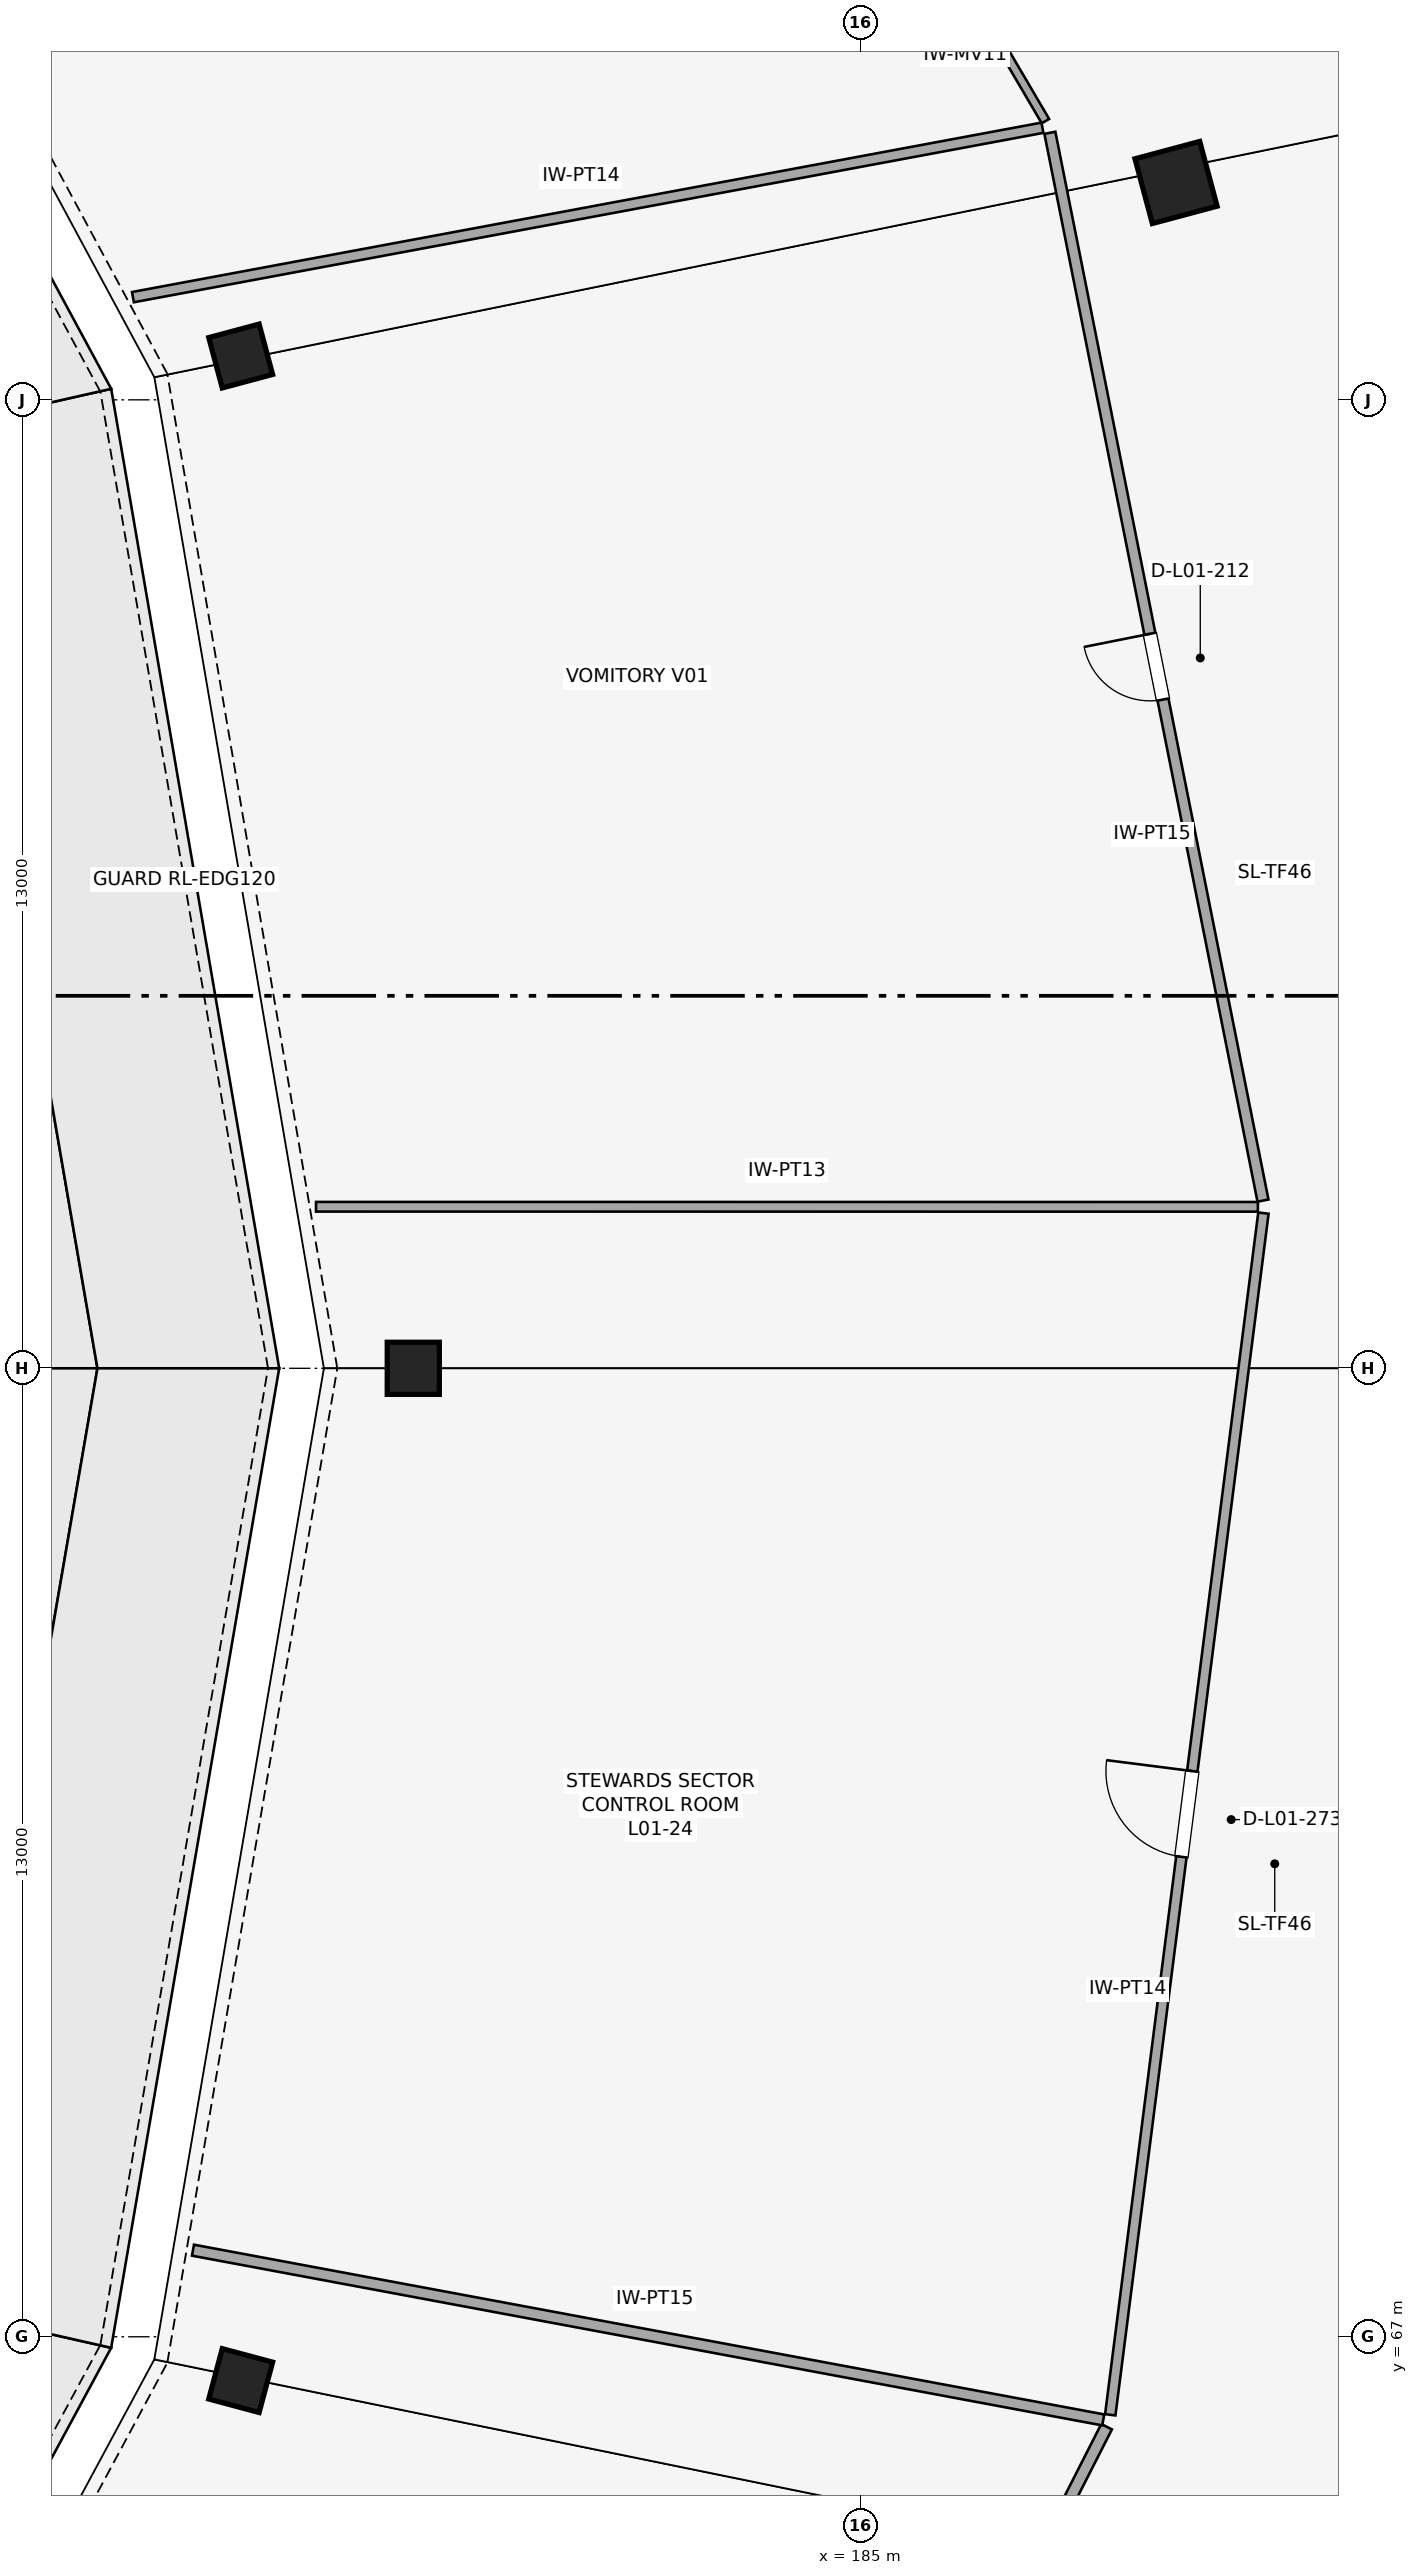
"""IFC4 building model, lengths in metres.
Left out: names, types, materials, properties, quantities, classifications, styles, units other than length and angle.
Written with IfcOpenShell. Run it as: python <this file> out.ifc"""

import sys

from ifc_helpers import new_model, si_unit, direction, frame, frame_2d, origin, origin_2d, place, context, subcontext, project, spatial, rectangle, extrude, element, fill, save


model = new_model("IFC4")
c1 = context("Model", 3, precision=1e-05, world=origin(), true_north=direction((0.0, 1.0)))
c2 = subcontext(c1, "Body", "Model", "MODEL_VIEW")
j1 = project(units=[si_unit("LENGTHUNIT", "METRE"), si_unit("PLANEANGLEUNIT", "RADIAN")], contexts=[c1])
p1 = place(None, origin())
s1 = spatial("IfcSite", under=j1, at=p1, CompositionType="ELEMENT")
p2 = place(p1, origin())
s2 = spatial("IfcBuilding", under=s1, at=p2, CompositionType="ELEMENT")
p3 = place(p2, frame((0.0, 0.0, 5.4)))
s3 = spatial("IfcBuildingStorey", under=s2, at=p3, CompositionType="ELEMENT", Elevation=5.4)
for number, where, z_axis, x_axis in (
    (1, (179.0, 80.0, 0.0), (0.0, 0.0, 1.0), (1.0, 0.0, 0.0)),
    (2, (176.683, 93.588, 0.0), (0.0, 0.0, 1.0), (0.966, 0.259, 0.0)),
    (3, (176.683, 66.412, 0.0), (0.0, 0.0, 1.0), (0.966, -0.259, 0.0)),
):
    element("IfcColumn", number, at=place(p3, frame(where, z_axis=z_axis, x_axis=x_axis)), inside=s3, PredefinedType="COLUMN", context=c2, shape_type="SweptSolid", body=[
        extrude(rectangle(XDim=0.7, YDim=0.7, at=origin_2d()), origin(), (0.0, 0.0, 1.0), 5.2),
    ])
p4 = place(p3, frame((189.24, 95.917, 0.0), z_axis=(0.0, 0.0, 1.0), x_axis=(0.965925826289, 0.258819045103, 0.0)))
e4 = element("IfcColumn", 4, at=p4, inside=s3, PredefinedType="COLUMN", context=c2, shape_type="SweptSolid", body=[
    extrude(rectangle(XDim=0.9, YDim=0.9, at=origin_2d()), origin(), (0.0, 0.0, 1.0), 5.2),
])
p5 = place(p3, frame((190.407, 82.251, 0.0), z_axis=(0.0, 0.0, 1.0), x_axis=(-0.195730656485, 0.980657692629, 0.0)))
e5 = element("IfcWall", 5, at=p5, inside=s3, PredefinedType="PARTITIONING", context=c2, shape_type="SweptSolid", body=[
    extrude(rectangle(XDim=14.616, YDim=0.15, at=frame_2d((7.308, 0.0))), origin(), (0.0, 0.0, 1.0), 3.67),
])
p6 = place(p5, frame((6.858, 0.0, 0.0)))
e6 = element("IfcOpeningElement", 6, at=p6, cuts=e5, PredefinedType="OPENING", context=c2, shape_type="SweptSolid", body=[
    extrude(rectangle(XDim=0.9, YDim=2.24, at=frame_2d((0.45, 1.12))), frame((0.0, 0.085, 0.0), z_axis=(0.0, -1.0, 0.0), x_axis=(1.0, 0.0, 0.0)), (0.0, 0.0, 1.0), 0.17),
])
p7 = place(p3, frame((175.237, 94.378, 0.0), z_axis=(0.0, 0.0, 1.0), x_axis=(0.983098219406, 0.183078920141, 0.0)))
e7 = element("IfcWall", 7, at=p7, inside=s3, PredefinedType="PARTITIONING", context=c2, shape_type="SweptSolid", body=[
    extrude(rectangle(XDim=12.419, YDim=0.14, at=frame_2d((6.209, 0.0))), origin(), (0.0, 0.0, 1.0), 3.67),
])
p8 = place(p3, frame((187.487, 96.741, 0.0), z_axis=(0.0, 0.0, 1.0), x_axis=(-0.506281615283, 0.862368207917, 0.0)))
e8 = element("IfcWall", 8, at=p8, inside=s3, PredefinedType="MOVABLE", context=c2, shape_type="SweptSolid", body=[
    extrude(rectangle(XDim=2.63, YDim=0.115, at=frame_2d((1.315, 0.0))), origin(), (0.0, 0.0, 1.0), 3.67),
])
p9 = place(p3, frame((180.579, 50.615, 0.0), z_axis=(0.0, 0.0, 1.0), x_axis=(0.453783837631, 0.891111793606, 0.0)))
e9 = element("IfcWall", 9, at=p9, inside=s3, PredefinedType="PARTITIONING", context=c2, shape_type="SweptSolid", body=[
    extrude(rectangle(XDim=17.032, YDim=0.16, at=frame_2d((8.516, 0.0))), origin(), (0.0, 0.0, 1.0), 3.67),
])
p10 = place(p9, frame((7.936, 0.0, 0.0)))
e10 = element("IfcOpeningElement", 10, at=p10, cuts=e9, PredefinedType="OPENING", context=c2, shape_type="SweptSolid", body=[
    extrude(rectangle(XDim=1.16, YDim=2.24, at=frame_2d((0.58, 1.12))), frame((0.0, 0.09, 0.0), z_axis=(0.0, -1.0, 0.0), x_axis=(1.0, 0.0, 0.0)), (0.0, 0.0, 1.0), 0.18),
])
p11 = place(p3, frame((176.042, 68.162, 0.0), z_axis=(0.0, 0.0, 1.0), x_axis=(0.983059999048, -0.183284037143, 0.0)))
e11 = element("IfcWall", 11, at=p11, inside=s3, PredefinedType="PARTITIONING", context=c2, shape_type="SweptSolid", body=[
    extrude(rectangle(XDim=12.431, YDim=0.15, at=frame_2d((6.215, 0.0))), origin(), (0.0, 0.0, 1.0), 3.67),
])
p12 = place(p3, frame((188.357, 65.953, 0.0), z_axis=(0.0, 0.0, 1.0), x_axis=(0.126447690865, 0.991973276593, 0.0)))
e12 = element("IfcWall", 12, at=p12, inside=s3, PredefinedType="PARTITIONING", context=c2, shape_type="SweptSolid", body=[
    extrude(rectangle(XDim=16.261, YDim=0.14, at=frame_2d((8.13, 0.0))), origin(), (0.0, 0.0, 1.0), 3.67),
])
p13 = place(p12, frame((7.551, 0.0, 0.0)))
e13 = element("IfcOpeningElement", 13, at=p13, cuts=e12, PredefinedType="OPENING", context=c2, shape_type="SweptSolid", body=[
    extrude(rectangle(XDim=1.16, YDim=2.38, at=frame_2d((0.58, 1.19))), frame((0.0, 0.08, 0.0), z_axis=(0.0, -1.0, 0.0), x_axis=(1.0, 0.0, 0.0)), (0.0, 0.0, 1.0), 0.16),
])
p14 = place(p3, frame((177.694, 82.168, 0.0), z_axis=(0.0, 0.0, 1.0), x_axis=(0.999999997017, -7.7233496e-05, 0.0)))
e14 = element("IfcWall", 14, at=p14, inside=s3, PredefinedType="PARTITIONING", context=c2, shape_type="SweptSolid", body=[
    extrude(rectangle(XDim=12.644, YDim=0.13, at=frame_2d((6.322, 0.0))), origin(), (0.0, 0.0, 1.0), 3.67),
])
p15 = place(p6, origin())
e15 = element("IfcDoor", 15, at=p15, inside=s3, OperationType="SINGLE_SWING_RIGHT", PredefinedType="DOOR", context=c2, shape_type="SweptSolid", body=[
    extrude(rectangle(XDim=0.9, YDim=2.24, at=frame_2d((0.45, 1.12))), frame((0.0, 0.025, 0.0), z_axis=(0.0, -1.0, 0.0), x_axis=(1.0, 0.0, 0.0)), (0.0, 0.0, 1.0), 0.05),
])
fill(e6, e15)
p16 = place(p13, origin())
e16 = element("IfcDoor", 16, at=p16, inside=s3, OperationType="SINGLE_SWING_RIGHT", PredefinedType="DOOR", context=c2, shape_type="SweptSolid", body=[
    extrude(rectangle(XDim=1.16, YDim=2.38, at=frame_2d((0.58, 1.19))), frame((0.0, 0.025, 0.0), z_axis=(0.0, -1.0, 0.0), x_axis=(1.0, 0.0, 0.0)), (0.0, 0.0, 1.0), 0.05),
])
fill(e13, e16)
save(model, sys.argv[1])
